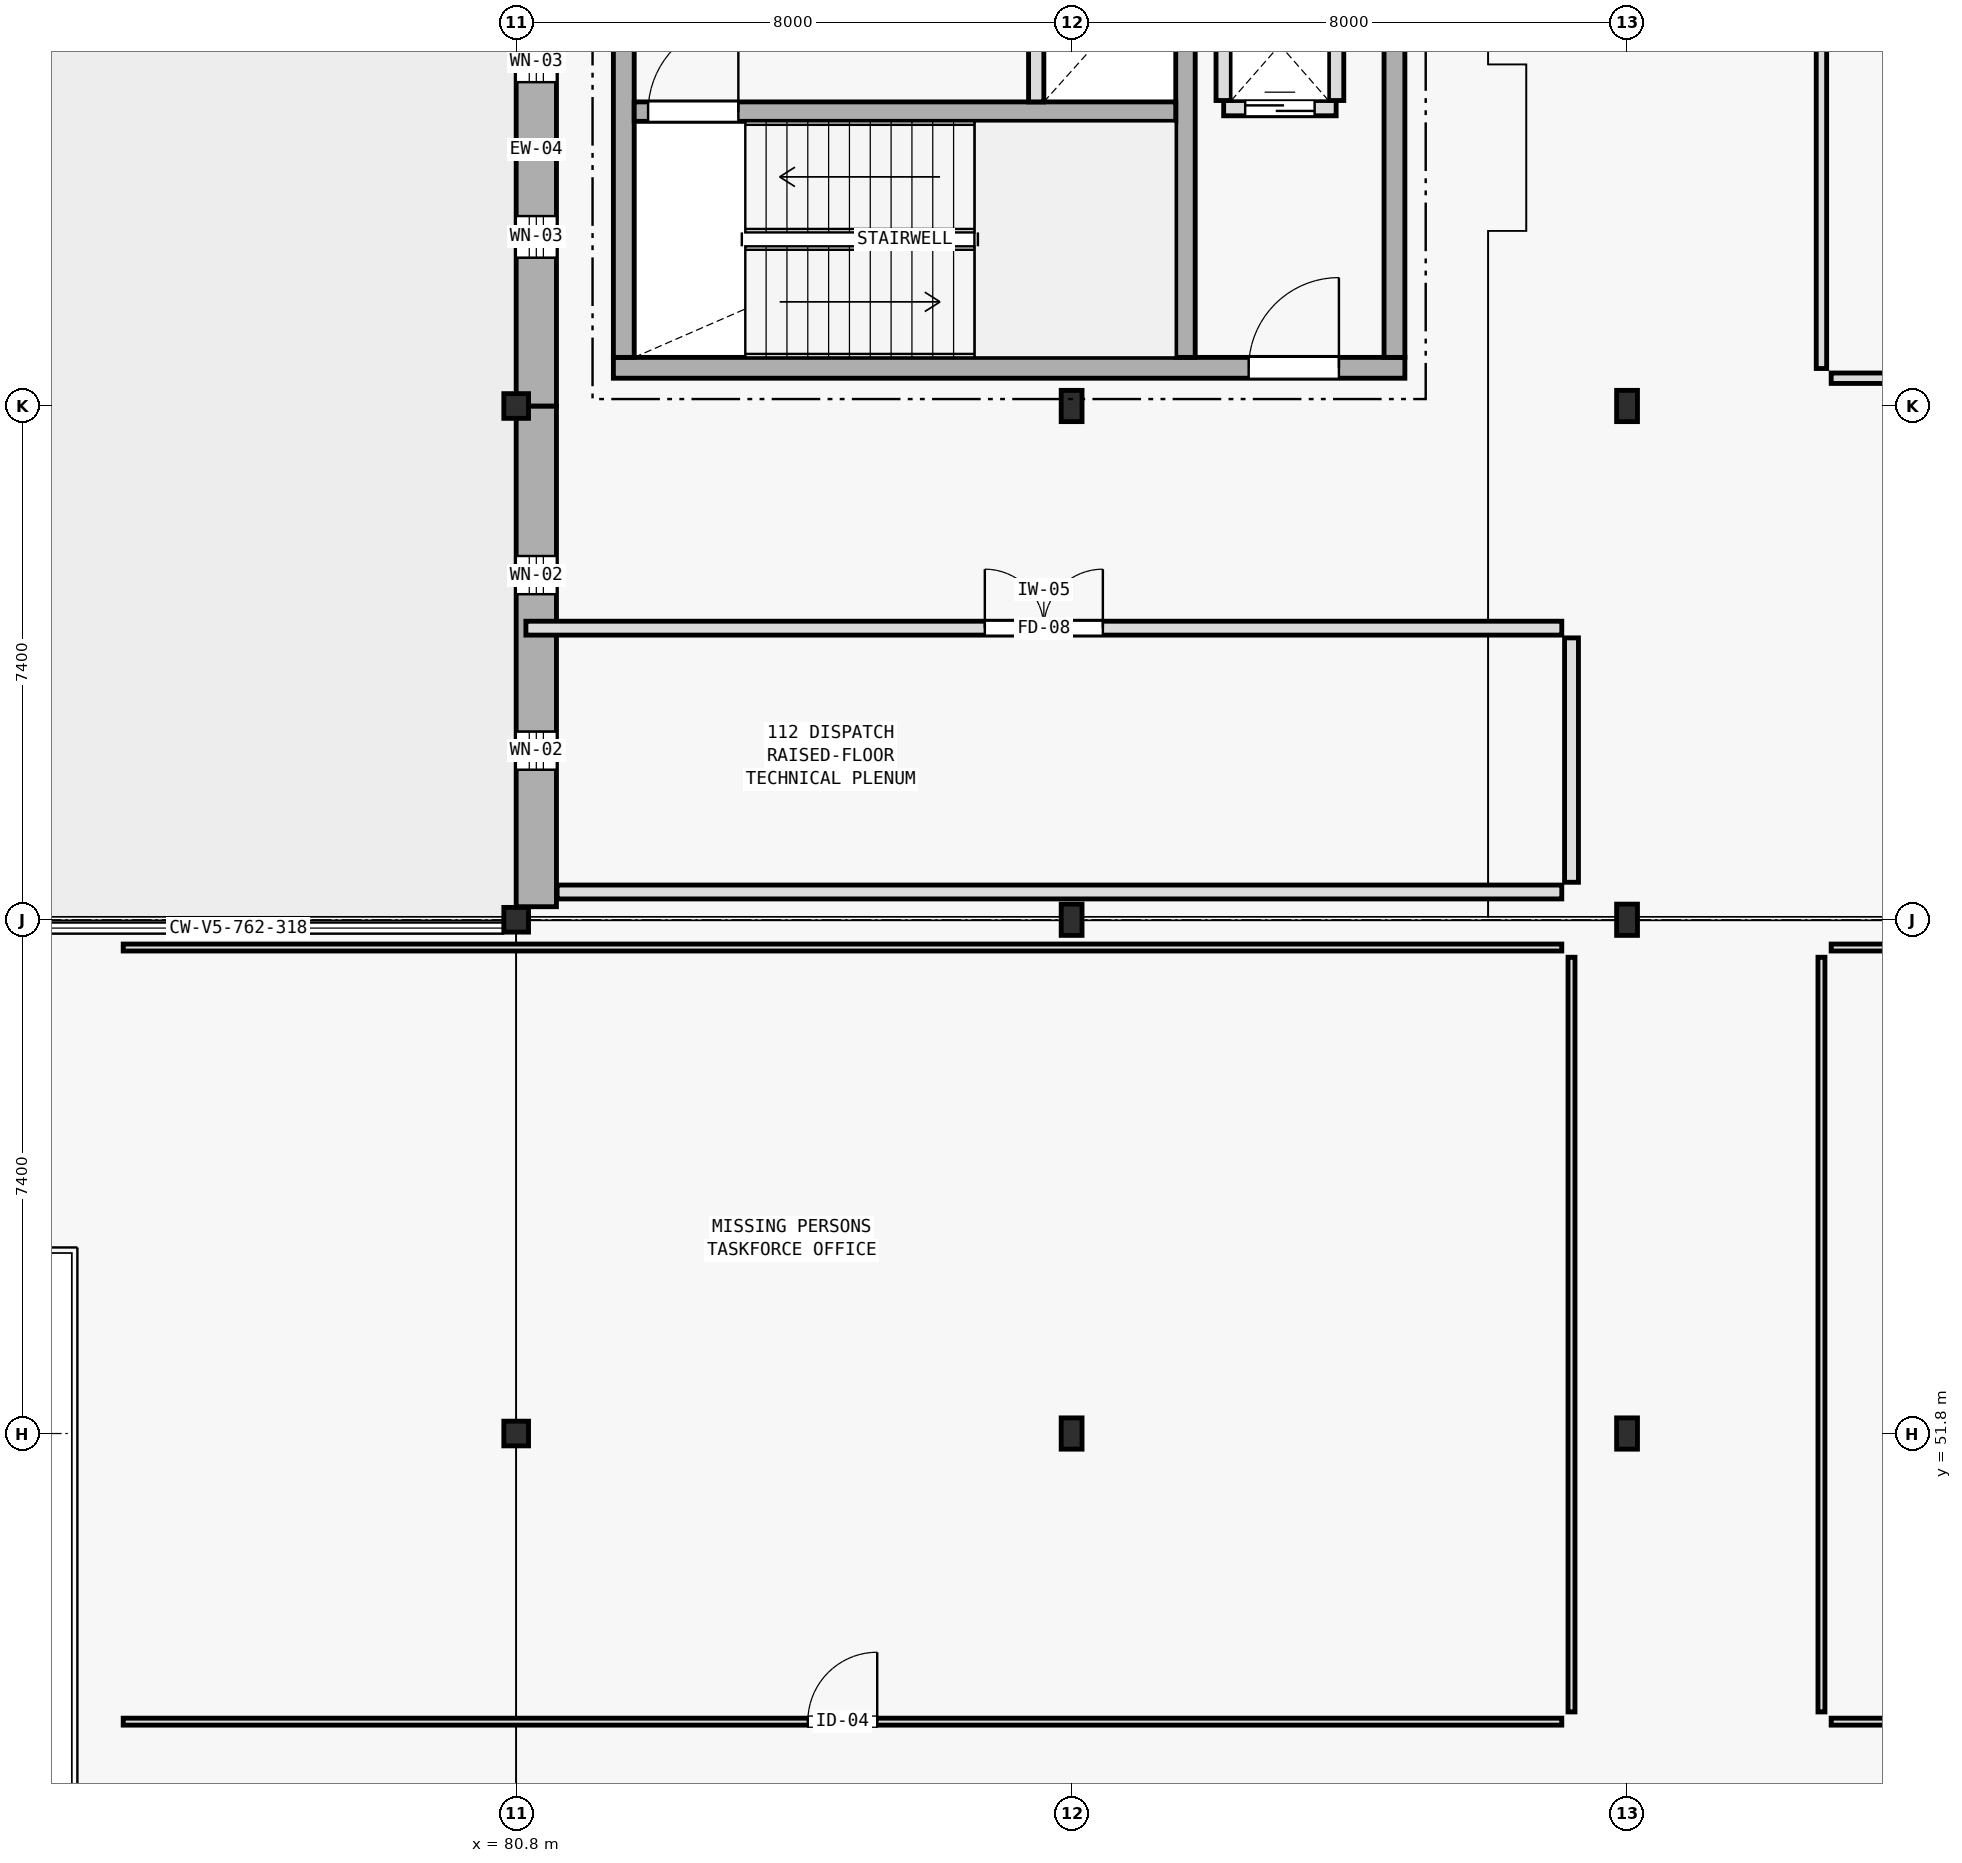
"""IFC4 building model, lengths in metres.
Left out: names, types, materials, properties, quantities, classifications, styles, units other than length and angle.
Written with IfcOpenShell. Run it as: python <this file> out.ifc"""

import sys

from ifc_helpers import new_model, si_unit, direction, frame, frame_2d, origin, origin_2d, place, context, subcontext, project, spatial, rectangle, hollow_circle, i_section, extrude, element, fill, save


model = new_model("IFC4")
c1 = context("Model", 3, precision=1e-05, world=origin(), true_north=direction((0.0, 1.0)))
c2 = subcontext(c1, "Body", "Model", "MODEL_VIEW")
j1 = project(units=[si_unit("LENGTHUNIT", "METRE"), si_unit("PLANEANGLEUNIT", "RADIAN")], contexts=[c1])
p1 = place(None, origin())
s1 = spatial("IfcSite", under=j1, at=p1, CompositionType="ELEMENT")
p2 = place(p1, origin())
s2 = spatial("IfcBuilding", under=s1, at=p2, CompositionType="ELEMENT")
p3 = place(p2, frame((0.0, 0.0, 14.1)))
s3 = spatial("IfcBuildingStorey", under=s2, at=p3, CompositionType="ELEMENT", Elevation=14.1)
p4 = place(p3, frame((82.2, 67.15, 0.0), z_axis=(0.0, 0.0, 1.0), x_axis=(1.0, 0.0, 0.0)))
e1 = element("IfcWall", 1, at=p4, inside=s3, PredefinedType="SHEAR", context=c2, shape_type="SweptSolid", body=[
    extrude(rectangle(XDim=11.4, YDim=0.3, at=frame_2d((5.7, 0.0))), origin(), (0.0, 0.0, 1.0), 3.995),
])
p5 = place(p4, frame((9.15, 0.0, 0.0)))
e2 = element("IfcOpeningElement", 2, at=p5, cuts=e1, PredefinedType="OPENING", context=c2, shape_type="SweptSolid", body=[
    extrude(rectangle(XDim=1.3, YDim=2.2, at=frame_2d((0.65, 1.1))), frame((0.0, 0.16, 0.0), z_axis=(0.0, -1.0, 0.0), x_axis=(1.0, 0.0, 0.0)), (0.0, 0.0, 1.0), 0.32),
])
for number, where, z_axis, x_axis in (
    (3, (82.35, 67.3, 0.0), (0.0, 0.0, 1.0), (0.0, 1.0, 0.0)),
    (4, (93.45, 67.3, 0.0), (0.0, 0.0, 1.0), (0.0, 1.0, 0.0)),
):
    element("IfcWall", number, at=place(p3, frame(where, z_axis=z_axis, x_axis=x_axis)), inside=s3, PredefinedType="SHEAR", context=c2, shape_type="SweptSolid", body=[
        extrude(rectangle(XDim=5.8, YDim=0.3, at=frame_2d((2.9, 0.0))), origin(), (0.0, 0.0, 1.0), 3.995),
    ])
p6 = place(p3, frame((90.44, 67.3, 0.0), z_axis=(0.0, 0.0, 1.0), x_axis=(0.0, 1.0, 0.0)))
e5 = element("IfcWall", 5, at=p6, inside=s3, PredefinedType="SHEAR", context=c2, shape_type="SweptSolid", body=[
    extrude(rectangle(XDim=5.8, YDim=0.28, at=frame_2d((2.9, 0.0))), origin(), (0.0, 0.0, 1.0), 3.995),
])
p7 = place(p3, frame((82.5, 70.84, 0.0), z_axis=(0.0, 0.0, 1.0), x_axis=(1.0, 0.0, 0.0)))
e6 = element("IfcWall", 6, at=p7, inside=s3, PredefinedType="SHEAR", context=c2, shape_type="SweptSolid", body=[
    extrude(rectangle(XDim=7.8, YDim=0.28, at=frame_2d((3.9, 0.0))), origin(), (0.0, 0.0, 1.0), 3.995),
])
p8 = place(p7, frame((0.2, 0.0, 0.0)))
e7 = element("IfcOpeningElement", 7, at=p8, cuts=e6, PredefinedType="OPENING", context=c2, shape_type="SweptSolid", body=[
    extrude(rectangle(XDim=1.3, YDim=2.2, at=frame_2d((0.65, 1.1))), frame((0.0, 0.15, 0.0), z_axis=(0.0, -1.0, 0.0), x_axis=(1.0, 0.0, 0.0)), (0.0, 0.0, 1.0), 0.3),
])
for number, where, z_axis, x_axis in (
    (8, (80.8, 51.8, 0.0), (0.0, 0.0, 1.0), (1.0, 0.0, 0.0)),
    (9, (80.8, 59.2, 0.0), (0.0, 0.0, 1.0), (1.0, 0.0, 0.0)),
    (10, (80.8, 66.6, 0.0), (0.0, 0.0, 1.0), (1.0, 0.0, 0.0)),
):
    element("IfcColumn", number, at=place(p3, frame(where, z_axis=z_axis, x_axis=x_axis)), inside=s3, PredefinedType="COLUMN", context=c2, shape_type="SweptSolid", body=[
        extrude(hollow_circle(Radius=0.178, WallThickness=0.016, at=origin_2d()), origin(), (0.0, 0.0, 1.0), 4.0),
    ])
for number, where, z_axis, x_axis in (
    (11, (88.8, 51.8, 0.0), (0.0, 0.0, 1.0), (1.0, 0.0, 0.0)),
    (12, (88.8, 59.2, 0.0), (0.0, 0.0, 1.0), (1.0, 0.0, 0.0)),
    (13, (88.8, 66.6, 0.0), (0.0, 0.0, 1.0), (1.0, 0.0, 0.0)),
    (14, (96.8, 51.8, 0.0), (0.0, 0.0, 1.0), (1.0, 0.0, 0.0)),
    (15, (96.8, 59.2, 0.0), (0.0, 0.0, 1.0), (1.0, 0.0, 0.0)),
    (16, (96.8, 66.6, 0.0), (0.0, 0.0, 1.0), (1.0, 0.0, 0.0)),
):
    element("IfcColumn", number, at=place(p3, frame(where, z_axis=z_axis, x_axis=x_axis)), inside=s3, PredefinedType="COLUMN", context=c2, shape_type="SweptSolid", body=[
        extrude(i_section(OverallWidth=0.3, OverallDepth=0.45, WebThickness=0.014, FlangeThickness=0.026, FilletRadius=0.027, at=origin_2d()), origin(), (0.0, 0.0, 1.0), 4.0),
    ])
p9 = place(p3, frame((81.09, 59.388, 0.0), z_axis=(0.0, 0.0, 1.0), x_axis=(0.0, 1.0, 0.0)))
e17 = element("IfcWall", 17, at=p9, inside=s3, PredefinedType="STANDARD", context=c2, shape_type="SweptSolid", body=[
    extrude(rectangle(XDim=7.212, YDim=0.58, at=frame_2d((3.606, 0.0))), origin(), (0.0, 0.0, 1.0), 3.74),
])
p10 = place(p9, frame((1.973, 0.0, 0.9)))
e18 = element("IfcOpeningElement", 18, at=p10, cuts=e17, PredefinedType="OPENING", context=c2, shape_type="SweptSolid", body=[
    extrude(rectangle(XDim=0.55, YDim=1.75, at=frame_2d((0.275, 0.875))), frame((0.0, 0.3, 0.0), z_axis=(0.0, -1.0, 0.0), x_axis=(1.0, 0.0, 0.0)), (0.0, 0.0, 1.0), 0.6),
])
p11 = place(p9, frame((4.502, 0.0, 0.9)))
e19 = element("IfcOpeningElement", 19, at=p11, cuts=e17, PredefinedType="OPENING", context=c2, shape_type="SweptSolid", body=[
    extrude(rectangle(XDim=0.55, YDim=1.75, at=frame_2d((0.275, 0.875))), frame((0.0, 0.3, 0.0), z_axis=(0.0, -1.0, 0.0), x_axis=(1.0, 0.0, 0.0)), (0.0, 0.0, 1.0), 0.6),
])
p12 = place(p3, frame((81.09, 66.6, 0.0), z_axis=(0.0, 0.0, 1.0), x_axis=(0.0, 1.0, 0.0)))
e20 = element("IfcWall", 20, at=p12, inside=s3, PredefinedType="STANDARD", context=c2, shape_type="SweptSolid", body=[
    extrude(rectangle(XDim=7.4, YDim=0.58, at=frame_2d((3.7, 0.0))), origin(), (0.0, 0.0, 1.0), 3.74),
])
p13 = place(p12, frame((2.135, 0.0, 1.35)))
e21 = element("IfcOpeningElement", 21, at=p13, cuts=e20, PredefinedType="OPENING", context=c2, shape_type="SweptSolid", body=[
    extrude(rectangle(XDim=0.6, YDim=1.5, at=frame_2d((0.3, 0.75))), frame((0.0, 0.3, 0.0), z_axis=(0.0, -1.0, 0.0), x_axis=(1.0, 0.0, 0.0)), (0.0, 0.0, 1.0), 0.6),
])
p14 = place(p12, frame((4.664, 0.0, 1.35)))
e22 = element("IfcOpeningElement", 22, at=p14, cuts=e20, PredefinedType="OPENING", context=c2, shape_type="SweptSolid", body=[
    extrude(rectangle(XDim=0.6, YDim=1.5, at=frame_2d((0.3, 0.75))), frame((0.0, 0.3, 0.0), z_axis=(0.0, -1.0, 0.0), x_axis=(1.0, 0.0, 0.0)), (0.0, 0.0, 1.0), 0.6),
])
p15 = place(p3, frame((90.99, 70.89, 0.0), z_axis=(0.0, 0.0, 1.0), x_axis=(1.0, 0.0, 0.0)))
e23 = element("IfcWall", 23, at=p15, inside=s3, PredefinedType="PLUMBINGWALL", context=c2, shape_type="SweptSolid", body=[
    extrude(rectangle(XDim=1.62, YDim=0.22, at=frame_2d((0.81, 0.0))), origin(), (0.0, 0.0, 1.0), 3.72),
])
p16 = place(p15, frame((0.31, 0.0, 0.0)))
e24 = element("IfcOpeningElement", 24, at=p16, cuts=e23, PredefinedType="OPENING", context=c2, shape_type="SweptSolid", body=[
    extrude(rectangle(XDim=1.0, YDim=2.2, at=frame_2d((0.5, 1.1))), frame((0.0, 0.12, 0.0), z_axis=(0.0, -1.0, 0.0), x_axis=(1.0, 0.0, 0.0)), (0.0, 0.0, 1.0), 0.24),
])
for number, where, z_axis, x_axis in (
    (25, (90.99, 71.0, 0.0), (0.0, 0.0, 1.0), (0.0, 1.0, 0.0)),
    (26, (92.61, 71.0, 0.0), (0.0, 0.0, 1.0), (0.0, 1.0, 0.0)),
):
    element("IfcWall", number, at=place(p3, frame(where, z_axis=z_axis, x_axis=x_axis)), inside=s3, PredefinedType="PLUMBINGWALL", context=c2, shape_type="SweptSolid", body=[
        extrude(rectangle(XDim=1.6, YDim=0.22, at=frame_2d((0.8, 0.0))), origin(), (0.0, 0.0, 1.0), 3.72),
    ])
p17 = place(p3, frame((88.29, 70.98, 0.0), z_axis=(0.0, 0.0, 1.0), x_axis=(0.0, 1.0, 0.0)))
e27 = element("IfcWall", 27, at=p17, inside=s3, PredefinedType="PLUMBINGWALL", context=c2, shape_type="SweptSolid", body=[
    extrude(rectangle(XDim=2.12, YDim=0.22, at=frame_2d((1.06, 0.0))), origin(), (0.0, 0.0, 1.0), 3.72),
])
p18 = place(p3, frame((75.14, 47.65, 0.0), z_axis=(0.0, 0.0, 1.0), x_axis=(1.0, 0.0, 0.0)))
e28 = element("IfcWall", 28, at=p18, inside=s3, PredefinedType="PARTITIONING", context=c2, shape_type="SweptSolid", body=[
    extrude(rectangle(XDim=20.72, YDim=0.1, at=frame_2d((10.36, 0.0))), origin(), (0.0, 0.0, 1.0), 3.245),
])
p19 = place(p18, frame((9.86, 0.0, 0.0)))
e29 = element("IfcOpeningElement", 29, at=p19, cuts=e28, PredefinedType="OPENING", context=c2, shape_type="SweptSolid", body=[
    extrude(rectangle(XDim=1.0, YDim=2.2, at=frame_2d((0.5, 1.1))), frame((0.0, 0.06, 0.0), z_axis=(0.0, -1.0, 0.0), x_axis=(1.0, 0.0, 0.0)), (0.0, 0.0, 1.0), 0.12),
])
p20 = place(p3, frame((75.14, 58.8, 0.0), z_axis=(0.0, 0.0, 1.0), x_axis=(1.0, 0.0, 0.0)))
e30 = element("IfcWall", 30, at=p20, inside=s3, PredefinedType="PARTITIONING", context=c2, shape_type="SweptSolid", body=[
    extrude(rectangle(XDim=20.72, YDim=0.1, at=frame_2d((10.36, 0.0))), origin(), (0.0, 0.0, 1.0), 3.23),
])
p21 = place(p3, frame((96.0, 47.79, 0.0), z_axis=(0.0, 0.0, 1.0), x_axis=(0.0, 1.0, 0.0)))
e31 = element("IfcWall", 31, at=p21, inside=s3, PredefinedType="PARTITIONING", context=c2, shape_type="SweptSolid", body=[
    extrude(rectangle(XDim=10.87, YDim=0.1, at=frame_2d((5.435, 0.0))), origin(), (0.0, 0.0, 1.0), 3.185),
])
p22 = place(p3, frame((99.74, 47.65, 0.0), z_axis=(0.0, 0.0, 1.0), x_axis=(1.0, 0.0, 0.0)))
e32 = element("IfcWall", 32, at=p22, inside=s3, PredefinedType="PARTITIONING", context=c2, shape_type="SweptSolid", body=[
    extrude(rectangle(XDim=20.32, YDim=0.1, at=frame_2d((10.16, 0.0))), origin(), (0.0, 0.0, 1.0), 3.16),
])
p23 = place(p22, frame((9.66, 0.0, 0.0)))
e33 = element("IfcOpeningElement", 33, at=p23, cuts=e32, PredefinedType="OPENING", context=c2, shape_type="SweptSolid", body=[
    extrude(rectangle(XDim=1.0, YDim=2.2, at=frame_2d((0.5, 1.1))), frame((0.0, 0.06, 0.0), z_axis=(0.0, -1.0, 0.0), x_axis=(1.0, 0.0, 0.0)), (0.0, 0.0, 1.0), 0.12),
])
p24 = place(p3, frame((99.74, 58.8, 0.0), z_axis=(0.0, 0.0, 1.0), x_axis=(1.0, 0.0, 0.0)))
e34 = element("IfcWall", 34, at=p24, inside=s3, PredefinedType="PARTITIONING", context=c2, shape_type="SweptSolid", body=[
    extrude(rectangle(XDim=20.32, YDim=0.1, at=frame_2d((10.16, 0.0))), origin(), (0.0, 0.0, 1.0), 3.16),
])
p25 = place(p3, frame((99.6, 47.79, 0.0), z_axis=(0.0, 0.0, 1.0), x_axis=(0.0, 1.0, 0.0)))
e35 = element("IfcWall", 35, at=p25, inside=s3, PredefinedType="PARTITIONING", context=c2, shape_type="SweptSolid", body=[
    extrude(rectangle(XDim=10.87, YDim=0.1, at=frame_2d((5.435, 0.0))), origin(), (0.0, 0.0, 1.0), 3.185),
])
p26 = place(p3, frame((81.39, 59.6, 0.0), z_axis=(0.0, 0.0, 1.0), x_axis=(1.0, 0.0, 0.0)))
e36 = element("IfcWall", 36, at=p26, inside=s3, PredefinedType="STANDARD", context=c2, shape_type="SweptSolid", body=[
    extrude(rectangle(XDim=14.47, YDim=0.2, at=frame_2d((7.235, 0.0))), origin(), (0.0, 0.0, 1.0), 3.23),
])
p27 = place(p3, frame((80.94, 63.4, 0.0), z_axis=(0.0, 0.0, 1.0), x_axis=(1.0, 0.0, 0.0)))
e37 = element("IfcWall", 37, at=p27, inside=s3, PredefinedType="STANDARD", context=c2, shape_type="SweptSolid", body=[
    extrude(rectangle(XDim=14.92, YDim=0.2, at=frame_2d((7.46, 0.0))), origin(), (0.0, 0.0, 1.0), 3.23),
])
p28 = place(p27, frame((6.61, 0.0, 0.0)))
e38 = element("IfcOpeningElement", 38, at=p28, cuts=e37, PredefinedType="OPENING", context=c2, shape_type="SweptSolid", body=[
    extrude(rectangle(XDim=1.7, YDim=2.4, at=frame_2d((0.85, 1.2))), frame((0.0, 0.11, 0.0), z_axis=(0.0, -1.0, 0.0), x_axis=(1.0, 0.0, 0.0)), (0.0, 0.0, 1.0), 0.22),
])
p29 = place(p3, frame((96.0, 59.74, 0.0), z_axis=(0.0, 0.0, 1.0), x_axis=(0.0, 1.0, 0.0)))
e39 = element("IfcWall", 39, at=p29, inside=s3, PredefinedType="STANDARD", context=c2, shape_type="SweptSolid", body=[
    extrude(rectangle(XDim=3.52, YDim=0.2, at=frame_2d((1.76, 0.0))), origin(), (0.0, 0.0, 1.0), 3.67),
])
p30 = place(p3, frame((99.74, 67.0, 0.0), z_axis=(0.0, 0.0, 1.0), x_axis=(1.0, 0.0, 0.0)))
e40 = element("IfcWall", 40, at=p30, inside=s3, PredefinedType="PARTITIONING", context=c2, shape_type="SweptSolid", body=[
    extrude(rectangle(XDim=4.32, YDim=0.15, at=frame_2d((2.16, 0.0))), origin(), (0.0, 0.0, 1.0), 3.67),
])
p31 = place(p30, frame((1.46, 0.0, 0.0)))
e41 = element("IfcOpeningElement", 41, at=p31, cuts=e40, PredefinedType="OPENING", context=c2, shape_type="SweptSolid", body=[
    extrude(rectangle(XDim=1.4, YDim=2.2, at=frame_2d((0.7, 1.1))), frame((0.0, 0.085, 0.0), z_axis=(0.0, -1.0, 0.0), x_axis=(1.0, 0.0, 0.0)), (0.0, 0.0, 1.0), 0.17),
])
p32 = place(p3, frame((99.6, 67.14, 0.0), z_axis=(0.0, 0.0, 1.0), x_axis=(0.0, 1.0, 0.0)))
e42 = element("IfcWall", 42, at=p32, inside=s3, PredefinedType="PARTITIONING", context=c2, shape_type="SweptSolid", body=[
    extrude(rectangle(XDim=13.72, YDim=0.15, at=frame_2d((6.86, 0.0))), origin(), (0.0, 0.0, 1.0), 3.67),
])
p33 = place(p10, origin())
e43 = element("IfcWindow", 43, at=p33, inside=s3, PartitioningType="SINGLE_PANEL", PredefinedType="WINDOW", context=c2, shape_type="SweptSolid", body=[
    extrude(rectangle(XDim=0.55, YDim=1.75, at=frame_2d((0.275, 0.875))), frame((0.0, 0.03, 0.0), z_axis=(0.0, -1.0, 0.0), x_axis=(1.0, 0.0, 0.0)), (0.0, 0.0, 1.0), 0.06),
])
fill(e18, e43)
p34 = place(p11, origin())
e44 = element("IfcWindow", 44, at=p34, inside=s3, PartitioningType="SINGLE_PANEL", PredefinedType="WINDOW", context=c2, shape_type="SweptSolid", body=[
    extrude(rectangle(XDim=0.55, YDim=1.75, at=frame_2d((0.275, 0.875))), frame((0.0, 0.03, 0.0), z_axis=(0.0, -1.0, 0.0), x_axis=(1.0, 0.0, 0.0)), (0.0, 0.0, 1.0), 0.06),
])
fill(e19, e44)
p35 = place(p13, origin())
e45 = element("IfcWindow", 45, at=p35, inside=s3, PartitioningType="SINGLE_PANEL", PredefinedType="WINDOW", context=c2, shape_type="SweptSolid", body=[
    extrude(rectangle(XDim=0.6, YDim=1.5, at=frame_2d((0.3, 0.75))), frame((0.0, 0.03, 0.0), z_axis=(0.0, -1.0, 0.0), x_axis=(1.0, 0.0, 0.0)), (0.0, 0.0, 1.0), 0.06),
])
fill(e21, e45)
p36 = place(p14, origin())
e46 = element("IfcWindow", 46, at=p36, inside=s3, PartitioningType="SINGLE_PANEL", PredefinedType="WINDOW", context=c2, shape_type="SweptSolid", body=[
    extrude(rectangle(XDim=0.6, YDim=1.5, at=frame_2d((0.3, 0.75))), frame((0.0, 0.03, 0.0), z_axis=(0.0, -1.0, 0.0), x_axis=(1.0, 0.0, 0.0)), (0.0, 0.0, 1.0), 0.06),
])
fill(e22, e46)
p37 = place(p8, origin())
e47 = element("IfcDoor", 47, at=p37, inside=s3, OperationType="SINGLE_SWING_RIGHT", PredefinedType="DOOR", context=c2, shape_type="SweptSolid", body=[
    extrude(rectangle(XDim=1.3, YDim=2.2, at=frame_2d((0.65, 1.1))), frame((0.0, 0.025, 0.0), z_axis=(0.0, -1.0, 0.0), x_axis=(1.0, 0.0, 0.0)), (0.0, 0.0, 1.0), 0.05),
])
fill(e7, e47)
p38 = place(p16, origin())
e48 = element("IfcDoor", 48, at=p38, inside=s3, OperationType="DOUBLE_DOOR_SLIDING", PredefinedType="DOOR", context=c2, shape_type="SweptSolid", body=[
    extrude(rectangle(XDim=1.0, YDim=2.2, at=frame_2d((0.5, 1.1))), frame((0.0, 0.025, 0.0), z_axis=(0.0, -1.0, 0.0), x_axis=(1.0, 0.0, 0.0)), (0.0, 0.0, 1.0), 0.05),
])
fill(e24, e48)
p39 = place(p5, origin())
e49 = element("IfcDoor", 49, at=p39, inside=s3, OperationType="SINGLE_SWING_RIGHT", PredefinedType="DOOR", context=c2, shape_type="SweptSolid", body=[
    extrude(rectangle(XDim=1.3, YDim=2.2, at=frame_2d((0.65, 1.1))), frame((0.0, 0.025, 0.0), z_axis=(0.0, -1.0, 0.0), x_axis=(1.0, 0.0, 0.0)), (0.0, 0.0, 1.0), 0.05),
])
fill(e2, e49)
p40 = place(p19, origin())
e50 = element("IfcDoor", 50, at=p40, inside=s3, OperationType="SINGLE_SWING_RIGHT", PredefinedType="DOOR", context=c2, shape_type="SweptSolid", body=[
    extrude(rectangle(XDim=1.0, YDim=2.2, at=frame_2d((0.5, 1.1))), frame((0.0, 0.025, 0.0), z_axis=(0.0, -1.0, 0.0), x_axis=(1.0, 0.0, 0.0)), (0.0, 0.0, 1.0), 0.05),
])
fill(e29, e50)
p41 = place(p28, origin())
e51 = element("IfcDoor", 51, at=p41, inside=s3, OperationType="DOUBLE_DOOR_SINGLE_SWING", PredefinedType="DOOR", context=c2, shape_type="SweptSolid", body=[
    extrude(rectangle(XDim=1.7, YDim=2.4, at=frame_2d((0.85, 1.2))), frame((0.0, 0.025, 0.0), z_axis=(0.0, -1.0, 0.0), x_axis=(1.0, 0.0, 0.0)), (0.0, 0.0, 1.0), 0.05),
])
fill(e38, e51)
save(model, sys.argv[1])
